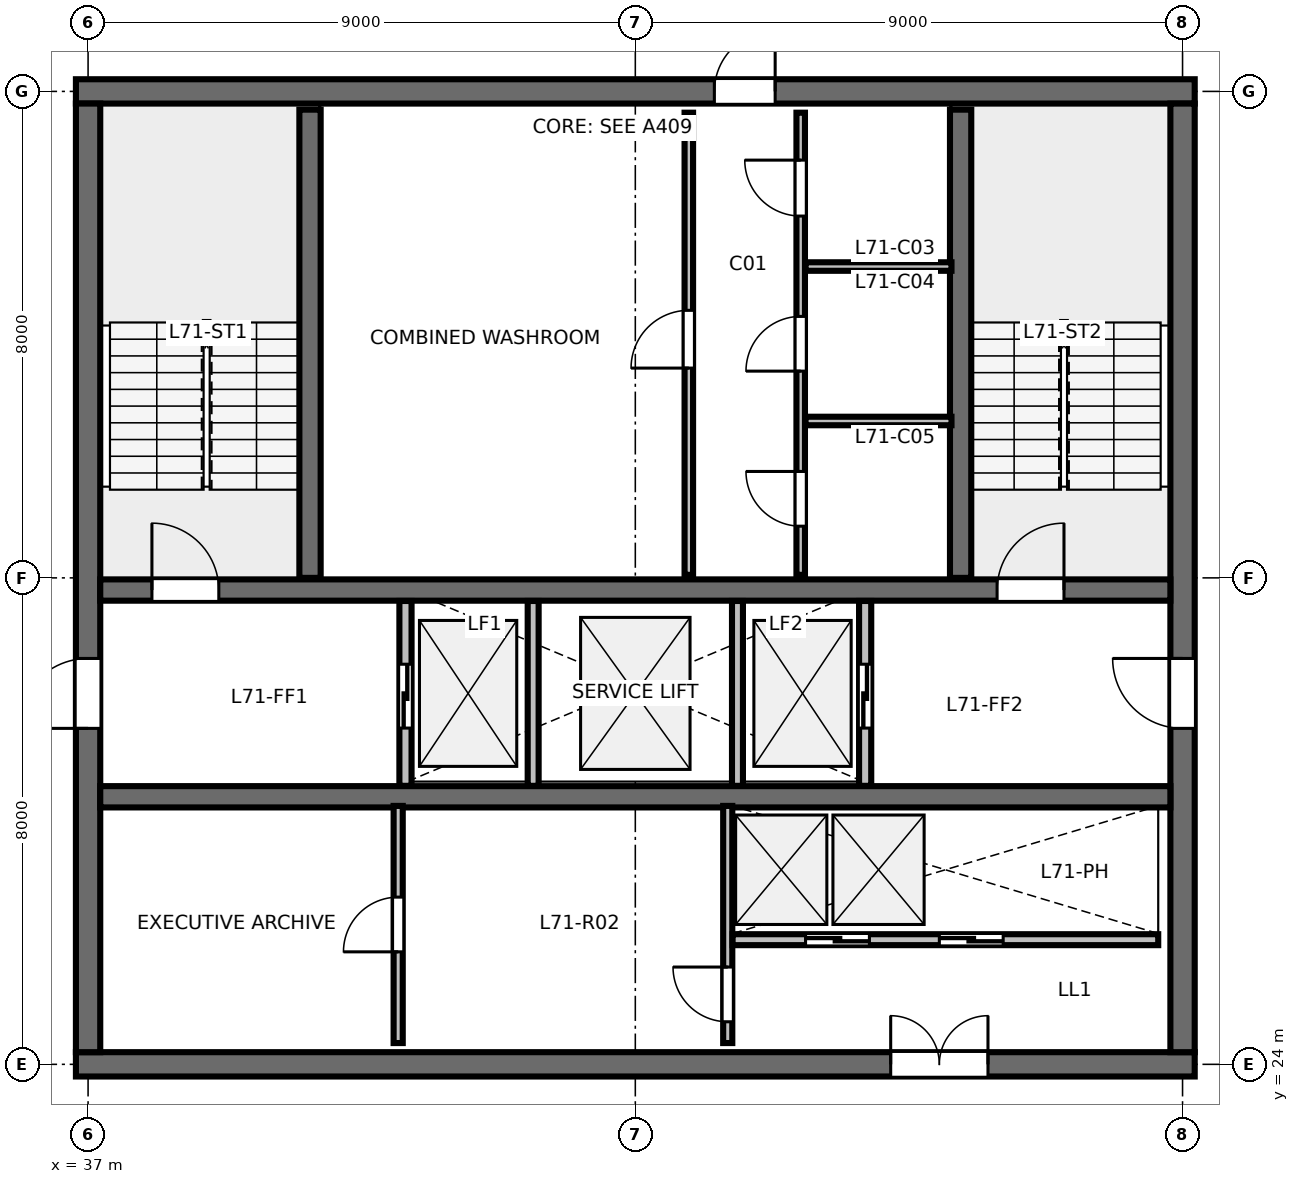
"""IFC4 building model, lengths in metres.
Left out: names, types, materials, properties, quantities, classifications, styles, units other than length and angle.
Written with IfcOpenShell. Run it as: python <this file> out.ifc"""

import sys

from ifc_helpers import new_model, si_unit, direction, frame, frame_2d, origin, place, context, subcontext, project, spatial, rectangle, extrude, element, fill, save


model = new_model("IFC4")
c1 = context("Model", 3, precision=1e-05, world=origin(), true_north=direction((0.0, 1.0)))
c2 = subcontext(c1, "Body", "Model", "MODEL_VIEW")
j1 = project(units=[si_unit("LENGTHUNIT", "METRE"), si_unit("PLANEANGLEUNIT", "RADIAN")], contexts=[c1])
p1 = place(None, origin())
s1 = spatial("IfcSite", under=j1, at=p1, CompositionType="ELEMENT")
p2 = place(p1, origin())
s2 = spatial("IfcBuilding", under=s1, at=p2, CompositionType="ELEMENT")
p3 = place(p2, frame((0.0, 0.0, 268.2)))
s3 = spatial("IfcBuildingStorey", under=s2, at=p3, CompositionType="ELEMENT", Elevation=268.2)
p4 = place(p3, frame((36.8, 24.0, 0.0), z_axis=(0.0, 0.0, 1.0), x_axis=(1.0, 0.0, 0.0)))
e1 = element("IfcWall", 1, at=p4, inside=s3, PredefinedType="SHEAR", context=c2, shape_type="SweptSolid", body=[
    extrude(rectangle(XDim=18.4, YDim=0.4, at=frame_2d((9.2, 0.0))), origin(), (0.0, 0.0, 1.0), 3.36),
])
p5 = place(p4, frame((13.4, 0.0, 0.0)))
e2 = element("IfcOpeningElement", 2, at=p5, cuts=e1, PredefinedType="OPENING", context=c2, shape_type="SweptSolid", body=[
    extrude(rectangle(XDim=1.6, YDim=2.15, at=frame_2d((0.8, 1.075))), frame((0.0, 0.21, 0.0), z_axis=(0.0, -1.0, 0.0), x_axis=(1.0, 0.0, 0.0)), (0.0, 0.0, 1.0), 0.42),
])
p6 = place(p3, frame((36.8, 40.0, 0.0), z_axis=(0.0, 0.0, 1.0), x_axis=(1.0, 0.0, 0.0)))
e3 = element("IfcWall", 3, at=p6, inside=s3, PredefinedType="SHEAR", context=c2, shape_type="SweptSolid", body=[
    extrude(rectangle(XDim=18.4, YDim=0.4, at=frame_2d((9.2, 0.0))), origin(), (0.0, 0.0, 1.0), 3.36),
])
p7 = place(p6, frame((10.5, 0.0, 0.0)))
e4 = element("IfcOpeningElement", 4, at=p7, cuts=e3, PredefinedType="OPENING", context=c2, shape_type="SweptSolid", body=[
    extrude(rectangle(XDim=1.0, YDim=2.15, at=frame_2d((0.5, 1.075))), frame((0.0, 0.21, 0.0), z_axis=(0.0, -1.0, 0.0), x_axis=(1.0, 0.0, 0.0)), (0.0, 0.0, 1.0), 0.42),
])
p8 = place(p3, frame((37.0, 24.2, 0.0), z_axis=(0.0, 0.0, 1.0), x_axis=(0.0, 1.0, 0.0)))
e5 = element("IfcWall", 5, at=p8, inside=s3, PredefinedType="SHEAR", context=c2, shape_type="SweptSolid", body=[
    extrude(rectangle(XDim=15.6, YDim=0.4, at=frame_2d((7.8, 0.0))), origin(), (0.0, 0.0, 1.0), 3.36),
])
p9 = place(p8, frame((5.325, 0.0, 0.0)))
e6 = element("IfcOpeningElement", 6, at=p9, cuts=e5, PredefinedType="OPENING", context=c2, shape_type="SweptSolid", body=[
    extrude(rectangle(XDim=1.15, YDim=2.15, at=frame_2d((0.575, 1.075))), frame((0.0, 0.21, 0.0), z_axis=(0.0, -1.0, 0.0), x_axis=(1.0, 0.0, 0.0)), (0.0, 0.0, 1.0), 0.42),
])
p10 = place(p3, frame((55.0, 24.2, 0.0), z_axis=(0.0, 0.0, 1.0), x_axis=(0.0, 1.0, 0.0)))
e7 = element("IfcWall", 7, at=p10, inside=s3, PredefinedType="SHEAR", context=c2, shape_type="SweptSolid", body=[
    extrude(rectangle(XDim=15.6, YDim=0.4, at=frame_2d((7.8, 0.0))), origin(), (0.0, 0.0, 1.0), 3.36),
])
p11 = place(p10, frame((5.325, 0.0, 0.0)))
e8 = element("IfcOpeningElement", 8, at=p11, cuts=e7, PredefinedType="OPENING", context=c2, shape_type="SweptSolid", body=[
    extrude(rectangle(XDim=1.15, YDim=2.15, at=frame_2d((0.575, 1.075))), frame((0.0, 0.21, 0.0), z_axis=(0.0, -1.0, 0.0), x_axis=(1.0, 0.0, 0.0)), (0.0, 0.0, 1.0), 0.42),
])
p12 = place(p3, frame((37.2, 31.8, 0.0), z_axis=(0.0, 0.0, 1.0), x_axis=(1.0, 0.0, 0.0)))
e9 = element("IfcWall", 9, at=p12, inside=s3, PredefinedType="SHEAR", context=c2, shape_type="SweptSolid", body=[
    extrude(rectangle(XDim=17.6, YDim=0.35, at=frame_2d((8.8, 0.0))), origin(), (0.0, 0.0, 1.0), 3.36),
])
p13 = place(p12, frame((0.85, 0.0, 0.0)))
e10 = element("IfcOpeningElement", 10, at=p13, cuts=e9, PredefinedType="OPENING", context=c2, shape_type="SweptSolid", body=[
    extrude(rectangle(XDim=1.1, YDim=2.15, at=frame_2d((0.55, 1.075))), frame((0.0, 0.185, 0.0), z_axis=(0.0, -1.0, 0.0), x_axis=(1.0, 0.0, 0.0)), (0.0, 0.0, 1.0), 0.37),
])
p14 = place(p12, frame((14.75, 0.0, 0.0)))
e11 = element("IfcOpeningElement", 11, at=p14, cuts=e9, PredefinedType="OPENING", context=c2, shape_type="SweptSolid", body=[
    extrude(rectangle(XDim=1.1, YDim=2.15, at=frame_2d((0.55, 1.075))), frame((0.0, 0.185, 0.0), z_axis=(0.0, -1.0, 0.0), x_axis=(1.0, 0.0, 0.0)), (0.0, 0.0, 1.0), 0.37),
])
p15 = place(p3, frame((37.2, 28.4, 0.0), z_axis=(0.0, 0.0, 1.0), x_axis=(1.0, 0.0, 0.0)))
e12 = element("IfcWall", 12, at=p15, inside=s3, PredefinedType="SHEAR", context=c2, shape_type="SweptSolid", body=[
    extrude(rectangle(XDim=17.6, YDim=0.35, at=frame_2d((8.8, 0.0))), origin(), (0.0, 0.0, 1.0), 3.36),
])
for number, where, z_axis, x_axis in (
    (13, (40.65, 32.0, 0.0), (0.0, 0.0, 1.0), (0.0, 1.0, 0.0)),
    (14, (51.35, 32.0, 0.0), (0.0, 0.0, 1.0), (0.0, 1.0, 0.0)),
):
    element("IfcWall", number, at=place(p3, frame(where, z_axis=z_axis, x_axis=x_axis)), inside=s3, PredefinedType="SHEAR", context=c2, shape_type="SweptSolid", body=[
        extrude(rectangle(XDim=7.7, YDim=0.35, at=frame_2d((3.85, 0.0))), origin(), (0.0, 0.0, 1.0), 3.6),
    ])
p16 = place(p3, frame((46.88, 32.05, 0.0), z_axis=(0.0, 0.0, 1.0), x_axis=(0.0, 1.0, 0.0)))
e15 = element("IfcWall", 15, at=p16, inside=s3, PredefinedType="PARTITIONING", context=c2, shape_type="SweptSolid", body=[
    extrude(rectangle(XDim=7.6, YDim=0.14, at=frame_2d((3.8, 0.0))), origin(), (0.0, 0.0, 1.0), 3.375),
])
p17 = place(p16, frame((3.4, 0.0, 0.0)))
e16 = element("IfcOpeningElement", 16, at=p17, cuts=e15, PredefinedType="OPENING", context=c2, shape_type="SweptSolid", body=[
    extrude(rectangle(XDim=0.95, YDim=2.15, at=frame_2d((0.475, 1.075))), frame((0.0, 0.08, 0.0), z_axis=(0.0, -1.0, 0.0), x_axis=(1.0, 0.0, 0.0)), (0.0, 0.0, 1.0), 0.16),
])
p18 = place(p3, frame((48.72, 32.05, 0.0), z_axis=(0.0, 0.0, 1.0), x_axis=(0.0, 1.0, 0.0)))
e17 = element("IfcWall", 17, at=p18, inside=s3, PredefinedType="PARTITIONING", context=c2, shape_type="SweptSolid", body=[
    extrude(rectangle(XDim=7.6, YDim=0.14, at=frame_2d((3.8, 0.0))), origin(), (0.0, 0.0, 1.0), 3.375),
])
p19 = place(p18, frame((0.8, 0.0, 0.0)))
e18 = element("IfcOpeningElement", 18, at=p19, cuts=e17, PredefinedType="OPENING", context=c2, shape_type="SweptSolid", body=[
    extrude(rectangle(XDim=0.9, YDim=2.15, at=frame_2d((0.45, 1.075))), frame((0.0, 0.08, 0.0), z_axis=(0.0, -1.0, 0.0), x_axis=(1.0, 0.0, 0.0)), (0.0, 0.0, 1.0), 0.16),
])
p20 = place(p18, frame((3.35, 0.0, 0.0)))
e19 = element("IfcOpeningElement", 19, at=p20, cuts=e17, PredefinedType="OPENING", context=c2, shape_type="SweptSolid", body=[
    extrude(rectangle(XDim=0.9, YDim=2.15, at=frame_2d((0.45, 1.075))), frame((0.0, 0.08, 0.0), z_axis=(0.0, -1.0, 0.0), x_axis=(1.0, 0.0, 0.0)), (0.0, 0.0, 1.0), 0.16),
])
p21 = place(p18, frame((5.9, 0.0, 0.0)))
e20 = element("IfcOpeningElement", 20, at=p21, cuts=e17, PredefinedType="OPENING", context=c2, shape_type="SweptSolid", body=[
    extrude(rectangle(XDim=0.92, YDim=2.15, at=frame_2d((0.46, 1.075))), frame((0.0, 0.08, 0.0), z_axis=(0.0, -1.0, 0.0), x_axis=(1.0, 0.0, 0.0)), (0.0, 0.0, 1.0), 0.16),
])
for number, where, z_axis, x_axis in (
    (21, (48.8, 34.58, 0.0), (0.0, 0.0, 1.0), (1.0, 0.0, 0.0)),
    (22, (48.8, 37.12, 0.0), (0.0, 0.0, 1.0), (1.0, 0.0, 0.0)),
):
    element("IfcWall", number, at=place(p3, frame(where, z_axis=z_axis, x_axis=x_axis)), inside=s3, PredefinedType="PARTITIONING", context=c2, shape_type="SweptSolid", body=[
        extrude(rectangle(XDim=2.4, YDim=0.14, at=frame_2d((1.2, 0.0))), origin(), (0.0, 0.0, 1.0), 3.375),
    ])
p22 = place(p3, frame((42.22, 28.58, 0.0), z_axis=(0.0, 0.0, 1.0), x_axis=(0.0, 1.0, 0.0)))
e23 = element("IfcWall", 23, at=p22, inside=s3, PredefinedType="PARTITIONING", context=c2, shape_type="SweptSolid", body=[
    extrude(rectangle(XDim=3.04, YDim=0.2, at=frame_2d((1.52, 0.0))), origin(), (0.0, 0.0, 1.0), 3.375),
])
p23 = place(p22, frame((0.95, 0.0, 0.0)))
e24 = element("IfcOpeningElement", 24, at=p23, cuts=e23, PredefinedType="OPENING", context=c2, shape_type="SweptSolid", body=[
    extrude(rectangle(XDim=1.05, YDim=2.15, at=frame_2d((0.525, 1.075))), frame((0.0, 0.11, 0.0), z_axis=(0.0, -1.0, 0.0), x_axis=(1.0, 0.0, 0.0)), (0.0, 0.0, 1.0), 0.22),
])
p24 = place(p3, frame((49.78, 28.58, 0.0), z_axis=(0.0, 0.0, 1.0), x_axis=(0.0, 1.0, 0.0)))
e25 = element("IfcWall", 25, at=p24, inside=s3, PredefinedType="PARTITIONING", context=c2, shape_type="SweptSolid", body=[
    extrude(rectangle(XDim=3.04, YDim=0.2, at=frame_2d((1.52, 0.0))), origin(), (0.0, 0.0, 1.0), 3.375),
])
p25 = place(p24, frame((0.95, 0.0, 0.0)))
e26 = element("IfcOpeningElement", 26, at=p25, cuts=e25, PredefinedType="OPENING", context=c2, shape_type="SweptSolid", body=[
    extrude(rectangle(XDim=1.05, YDim=2.15, at=frame_2d((0.525, 1.075))), frame((0.0, 0.11, 0.0), z_axis=(0.0, -1.0, 0.0), x_axis=(1.0, 0.0, 0.0)), (0.0, 0.0, 1.0), 0.22),
])
for number, where, z_axis, x_axis in (
    (27, (44.32, 28.58, 0.0), (0.0, 0.0, 1.0), (0.0, 1.0, 0.0)),
    (28, (47.68, 28.58, 0.0), (0.0, 0.0, 1.0), (0.0, 1.0, 0.0)),
):
    element("IfcWall", number, at=place(p3, frame(where, z_axis=z_axis, x_axis=x_axis)), inside=s3, PredefinedType="PARTITIONING", context=c2, shape_type="SweptSolid", body=[
        extrude(rectangle(XDim=3.04, YDim=0.18, at=frame_2d((1.52, 0.0))), origin(), (0.0, 0.0, 1.0), 3.375),
    ])
p26 = place(p3, frame((42.1, 24.35, 0.0), z_axis=(0.0, 0.0, 1.0), x_axis=(0.0, 1.0, 0.0)))
e29 = element("IfcWall", 29, at=p26, inside=s3, PredefinedType="PARTITIONING", context=c2, shape_type="SweptSolid", body=[
    extrude(rectangle(XDim=3.9, YDim=0.15, at=frame_2d((1.95, 0.0))), origin(), (0.0, 0.0, 1.0), 3.375),
])
p27 = place(p26, frame((1.5, 0.0, 0.0)))
e30 = element("IfcOpeningElement", 30, at=p27, cuts=e29, PredefinedType="OPENING", context=c2, shape_type="SweptSolid", body=[
    extrude(rectangle(XDim=0.9, YDim=2.15, at=frame_2d((0.45, 1.075))), frame((0.0, 0.085, 0.0), z_axis=(0.0, -1.0, 0.0), x_axis=(1.0, 0.0, 0.0)), (0.0, 0.0, 1.0), 0.17),
])
p28 = place(p3, frame((47.52, 24.35, 0.0), z_axis=(0.0, 0.0, 1.0), x_axis=(0.0, 1.0, 0.0)))
e31 = element("IfcWall", 31, at=p28, inside=s3, PredefinedType="PARTITIONING", context=c2, shape_type="SweptSolid", body=[
    extrude(rectangle(XDim=3.9, YDim=0.15, at=frame_2d((1.95, 0.0))), origin(), (0.0, 0.0, 1.0), 3.375),
])
p29 = place(p28, frame((0.35, 0.0, 0.0)))
e32 = element("IfcOpeningElement", 32, at=p29, cuts=e31, PredefinedType="OPENING", context=c2, shape_type="SweptSolid", body=[
    extrude(rectangle(XDim=0.9, YDim=2.15, at=frame_2d((0.45, 1.075))), frame((0.0, 0.085, 0.0), z_axis=(0.0, -1.0, 0.0), x_axis=(1.0, 0.0, 0.0)), (0.0, 0.0, 1.0), 0.17),
])
p30 = place(p3, frame((47.6, 26.05, 0.0), z_axis=(0.0, 0.0, 1.0), x_axis=(1.0, 0.0, 0.0)))
e33 = element("IfcWall", 33, at=p30, inside=s3, PredefinedType="PARTITIONING", context=c2, shape_type="SweptSolid", body=[
    extrude(rectangle(XDim=7.0, YDim=0.18, at=frame_2d((3.5, 0.0))), origin(), (0.0, 0.0, 1.0), 3.375),
])
p31 = place(p30, frame((1.2, 0.0, 0.0)))
e34 = element("IfcOpeningElement", 34, at=p31, cuts=e33, PredefinedType="OPENING", context=c2, shape_type="SweptSolid", body=[
    extrude(rectangle(XDim=1.05, YDim=2.15, at=frame_2d((0.525, 1.075))), frame((0.0, 0.1, 0.0), z_axis=(0.0, -1.0, 0.0), x_axis=(1.0, 0.0, 0.0)), (0.0, 0.0, 1.0), 0.2),
])
p32 = place(p30, frame((3.4, 0.0, 0.0)))
e35 = element("IfcOpeningElement", 35, at=p32, cuts=e33, PredefinedType="OPENING", context=c2, shape_type="SweptSolid", body=[
    extrude(rectangle(XDim=1.05, YDim=2.15, at=frame_2d((0.525, 1.075))), frame((0.0, 0.1, 0.0), z_axis=(0.0, -1.0, 0.0), x_axis=(1.0, 0.0, 0.0)), (0.0, 0.0, 1.0), 0.2),
])
p33 = place(p13, origin())
e36 = element("IfcDoor", 36, at=p33, inside=s3, OperationType="SINGLE_SWING_LEFT", PredefinedType="DOOR", context=c2, shape_type="SweptSolid", body=[
    extrude(rectangle(XDim=1.1, YDim=2.15, at=frame_2d((0.55, 1.075))), frame((0.0, 0.025, 0.0), z_axis=(0.0, -1.0, 0.0), x_axis=(1.0, 0.0, 0.0)), (0.0, 0.0, 1.0), 0.05),
])
fill(e10, e36)
p34 = place(p14, origin())
e37 = element("IfcDoor", 37, at=p34, inside=s3, OperationType="SINGLE_SWING_RIGHT", PredefinedType="DOOR", context=c2, shape_type="SweptSolid", body=[
    extrude(rectangle(XDim=1.1, YDim=2.15, at=frame_2d((0.55, 1.075))), frame((0.0, 0.025, 0.0), z_axis=(0.0, -1.0, 0.0), x_axis=(1.0, 0.0, 0.0)), (0.0, 0.0, 1.0), 0.05),
])
fill(e11, e37)
p35 = place(p7, origin())
e38 = element("IfcDoor", 38, at=p35, inside=s3, OperationType="SINGLE_SWING_RIGHT", PredefinedType="DOOR", context=c2, shape_type="SweptSolid", body=[
    extrude(rectangle(XDim=1.0, YDim=2.15, at=frame_2d((0.5, 1.075))), frame((0.0, 0.025, 0.0), z_axis=(0.0, -1.0, 0.0), x_axis=(1.0, 0.0, 0.0)), (0.0, 0.0, 1.0), 0.05),
])
fill(e4, e38)
p36 = place(p9, origin())
e39 = element("IfcDoor", 39, at=p36, inside=s3, OperationType="SINGLE_SWING_LEFT", PredefinedType="DOOR", context=c2, shape_type="SweptSolid", body=[
    extrude(rectangle(XDim=1.15, YDim=2.15, at=frame_2d((0.575, 1.075))), frame((0.0, 0.025, 0.0), z_axis=(0.0, -1.0, 0.0), x_axis=(1.0, 0.0, 0.0)), (0.0, 0.0, 1.0), 0.05),
])
fill(e6, e39)
p37 = place(p11, origin())
e40 = element("IfcDoor", 40, at=p37, inside=s3, OperationType="SINGLE_SWING_RIGHT", PredefinedType="DOOR", context=c2, shape_type="SweptSolid", body=[
    extrude(rectangle(XDim=1.15, YDim=2.15, at=frame_2d((0.575, 1.075))), frame((0.0, 0.025, 0.0), z_axis=(0.0, -1.0, 0.0), x_axis=(1.0, 0.0, 0.0)), (0.0, 0.0, 1.0), 0.05),
])
fill(e8, e40)
p38 = place(p5, origin())
e41 = element("IfcDoor", 41, at=p38, inside=s3, OperationType="DOUBLE_DOOR_SINGLE_SWING", PredefinedType="DOOR", context=c2, shape_type="SweptSolid", body=[
    extrude(rectangle(XDim=1.6, YDim=2.15, at=frame_2d((0.8, 1.075))), frame((0.0, 0.025, 0.0), z_axis=(0.0, -1.0, 0.0), x_axis=(1.0, 0.0, 0.0)), (0.0, 0.0, 1.0), 0.05),
])
fill(e2, e41)
p39 = place(p17, origin())
e42 = element("IfcDoor", 42, at=p39, inside=s3, OperationType="SINGLE_SWING_LEFT", PredefinedType="DOOR", context=c2, shape_type="SweptSolid", body=[
    extrude(rectangle(XDim=0.95, YDim=2.15, at=frame_2d((0.475, 1.075))), frame((0.0, 0.025, 0.0), z_axis=(0.0, -1.0, 0.0), x_axis=(1.0, 0.0, 0.0)), (0.0, 0.0, 1.0), 0.05),
])
fill(e16, e42)
p40 = place(p19, origin())
e43 = element("IfcDoor", 43, at=p40, inside=s3, OperationType="SINGLE_SWING_RIGHT", PredefinedType="DOOR", context=c2, shape_type="SweptSolid", body=[
    extrude(rectangle(XDim=0.9, YDim=2.15, at=frame_2d((0.45, 1.075))), frame((0.0, 0.025, 0.0), z_axis=(0.0, -1.0, 0.0), x_axis=(1.0, 0.0, 0.0)), (0.0, 0.0, 1.0), 0.05),
])
fill(e18, e43)
p41 = place(p20, origin())
e44 = element("IfcDoor", 44, at=p41, inside=s3, OperationType="SINGLE_SWING_LEFT", PredefinedType="DOOR", context=c2, shape_type="SweptSolid", body=[
    extrude(rectangle(XDim=0.9, YDim=2.15, at=frame_2d((0.45, 1.075))), frame((0.0, 0.025, 0.0), z_axis=(0.0, -1.0, 0.0), x_axis=(1.0, 0.0, 0.0)), (0.0, 0.0, 1.0), 0.05),
])
fill(e19, e44)
p42 = place(p21, origin())
e45 = element("IfcDoor", 45, at=p42, inside=s3, OperationType="SINGLE_SWING_RIGHT", PredefinedType="DOOR", context=c2, shape_type="SweptSolid", body=[
    extrude(rectangle(XDim=0.92, YDim=2.15, at=frame_2d((0.46, 1.075))), frame((0.0, 0.025, 0.0), z_axis=(0.0, -1.0, 0.0), x_axis=(1.0, 0.0, 0.0)), (0.0, 0.0, 1.0), 0.05),
])
fill(e20, e45)
p43 = place(p23, origin())
e46 = element("IfcDoor", 46, at=p43, inside=s3, OperationType="SLIDING_TO_LEFT", PredefinedType="DOOR", context=c2, shape_type="SweptSolid", body=[
    extrude(rectangle(XDim=1.05, YDim=2.15, at=frame_2d((0.525, 1.075))), frame((0.0, 0.025, 0.0), z_axis=(0.0, -1.0, 0.0), x_axis=(1.0, 0.0, 0.0)), (0.0, 0.0, 1.0), 0.05),
])
fill(e24, e46)
p44 = place(p25, origin())
e47 = element("IfcDoor", 47, at=p44, inside=s3, OperationType="SLIDING_TO_RIGHT", PredefinedType="DOOR", context=c2, shape_type="SweptSolid", body=[
    extrude(rectangle(XDim=1.05, YDim=2.15, at=frame_2d((0.525, 1.075))), frame((0.0, 0.025, 0.0), z_axis=(0.0, -1.0, 0.0), x_axis=(1.0, 0.0, 0.0)), (0.0, 0.0, 1.0), 0.05),
])
fill(e26, e47)
p45 = place(p27, origin())
e48 = element("IfcDoor", 48, at=p45, inside=s3, OperationType="SINGLE_SWING_LEFT", PredefinedType="DOOR", context=c2, shape_type="SweptSolid", body=[
    extrude(rectangle(XDim=0.9, YDim=2.15, at=frame_2d((0.45, 1.075))), frame((0.0, 0.025, 0.0), z_axis=(0.0, -1.0, 0.0), x_axis=(1.0, 0.0, 0.0)), (0.0, 0.0, 1.0), 0.05),
])
fill(e30, e48)
p46 = place(p29, origin())
e49 = element("IfcDoor", 49, at=p46, inside=s3, OperationType="SINGLE_SWING_RIGHT", PredefinedType="DOOR", context=c2, shape_type="SweptSolid", body=[
    extrude(rectangle(XDim=0.9, YDim=2.15, at=frame_2d((0.45, 1.075))), frame((0.0, 0.025, 0.0), z_axis=(0.0, -1.0, 0.0), x_axis=(1.0, 0.0, 0.0)), (0.0, 0.0, 1.0), 0.05),
])
fill(e32, e49)
p47 = place(p31, origin())
e50 = element("IfcDoor", 50, at=p47, inside=s3, OperationType="SLIDING_TO_LEFT", PredefinedType="DOOR", context=c2, shape_type="SweptSolid", body=[
    extrude(rectangle(XDim=1.05, YDim=2.15, at=frame_2d((0.525, 1.075))), frame((0.0, 0.025, 0.0), z_axis=(0.0, -1.0, 0.0), x_axis=(1.0, 0.0, 0.0)), (0.0, 0.0, 1.0), 0.05),
])
fill(e34, e50)
p48 = place(p32, origin())
e51 = element("IfcDoor", 51, at=p48, inside=s3, OperationType="SLIDING_TO_RIGHT", PredefinedType="DOOR", context=c2, shape_type="SweptSolid", body=[
    extrude(rectangle(XDim=1.05, YDim=2.15, at=frame_2d((0.525, 1.075))), frame((0.0, 0.025, 0.0), z_axis=(0.0, -1.0, 0.0), x_axis=(1.0, 0.0, 0.0)), (0.0, 0.0, 1.0), 0.05),
])
fill(e35, e51)
save(model, sys.argv[1])
